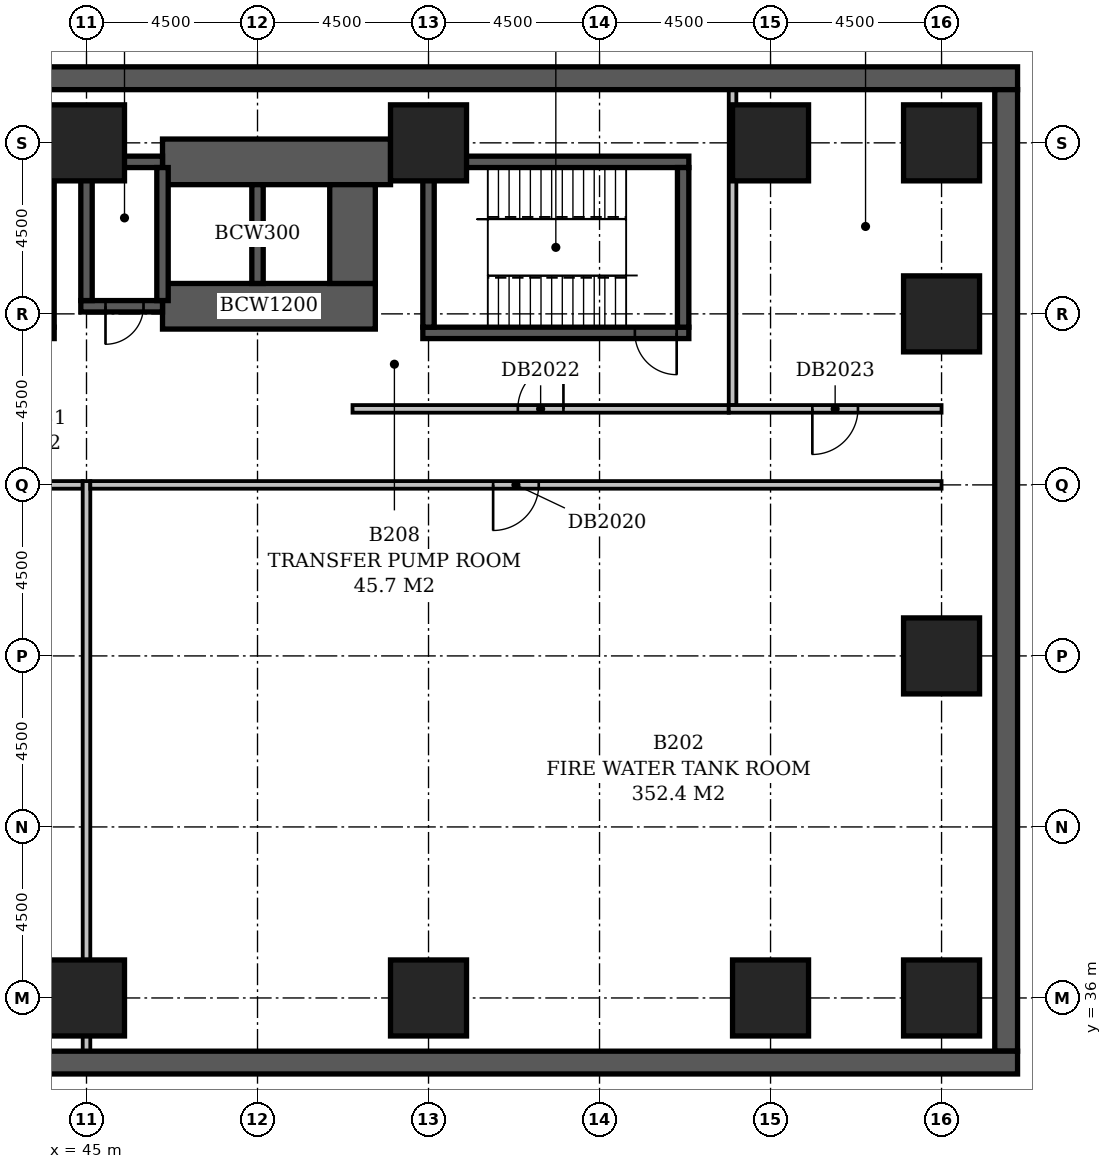
"""IFC4 building model, lengths in metres.
Left out: names, types, materials, properties, quantities, classifications, styles, units other than length and angle.
Written with IfcOpenShell. Run it as: python <this file> out.ifc"""

import sys

from ifc_helpers import new_model, si_unit, direction, frame, frame_2d, origin, origin_2d, place, context, subcontext, project, spatial, rectangle, extrude, element, fill, save


model = new_model("IFC4")
c1 = context("Model", 3, precision=1e-05, world=origin(), true_north=direction((0.0, 1.0)))
c2 = subcontext(c1, "Body", "Model", "MODEL_VIEW")
j1 = project(units=[si_unit("LENGTHUNIT", "METRE"), si_unit("PLANEANGLEUNIT", "RADIAN")], contexts=[c1])
p1 = place(None, origin())
s1 = spatial("IfcSite", under=j1, at=p1, CompositionType="ELEMENT")
p2 = place(p1, origin())
s2 = spatial("IfcBuilding", under=s1, at=p2, CompositionType="ELEMENT")
p3 = place(p2, frame((0.0, 0.0, -9.0)))
s3 = spatial("IfcBuildingStorey", under=s2, at=p3, CompositionType="ELEMENT", Elevation=-9.0)
for number, where, z_axis, x_axis in (
    (1, (45.0, 36.0, 0.0), (0.0, 0.0, 1.0), (1.0, 0.0, 0.0)),
    (2, (54.0, 36.0, 0.0), (0.0, 0.0, 1.0), (1.0, 0.0, 0.0)),
    (3, (63.0, 36.0, 0.0), (0.0, 0.0, 1.0), (1.0, 0.0, 0.0)),
    (4, (67.5, 36.0, 0.0), (0.0, 0.0, 1.0), (1.0, 0.0, 0.0)),
    (5, (67.5, 45.0, 0.0), (0.0, 0.0, 1.0), (1.0, 0.0, 0.0)),
    (6, (67.5, 54.0, 0.0), (0.0, 0.0, 1.0), (1.0, 0.0, 0.0)),
    (7, (45.0, 58.5, 0.0), (0.0, 0.0, 1.0), (1.0, 0.0, 0.0)),
    (8, (54.0, 58.5, 0.0), (0.0, 0.0, 1.0), (1.0, 0.0, 0.0)),
    (9, (63.0, 58.5, 0.0), (0.0, 0.0, 1.0), (1.0, 0.0, 0.0)),
    (10, (67.5, 58.5, 0.0), (0.0, 0.0, 1.0), (1.0, 0.0, 0.0)),
):
    element("IfcColumn", number, at=place(p3, frame(where, z_axis=z_axis, x_axis=x_axis)), inside=s3, PredefinedType="COLUMN", context=c2, shape_type="SweptSolid", body=[
        extrude(rectangle(XDim=2.0, YDim=2.0, at=origin_2d()), origin(), (0.0, 0.0, 1.0), 4.1),
    ])
p4 = place(p3, frame((-2.0, 60.2, 0.0), z_axis=(0.0, 0.0, 1.0), x_axis=(1.0, 0.0, 0.0)))
e11 = element("IfcWall", 11, at=p4, inside=s3, PredefinedType="SOLIDWALL", context=c2, shape_type="SweptSolid", body=[
    extrude(rectangle(XDim=71.5, YDim=0.6, at=frame_2d((35.75, 0.0))), origin(), (0.0, 0.0, 1.0), 4.1),
])
p5 = place(p3, frame((69.2, 59.9, 0.0), z_axis=(0.0, 0.0, 1.0), x_axis=(0.0, -1.0, 0.0)))
e12 = element("IfcWall", 12, at=p5, inside=s3, PredefinedType="SOLIDWALL", context=c2, shape_type="SweptSolid", body=[
    extrude(rectangle(XDim=25.3, YDim=0.6, at=frame_2d((12.65, 0.0))), origin(), (0.0, 0.0, 1.0), 4.1),
])
p6 = place(p3, frame((69.5, 34.3, 0.0), z_axis=(0.0, 0.0, 1.0), x_axis=(-1.0, 0.0, 0.0)))
e13 = element("IfcWall", 13, at=p6, inside=s3, PredefinedType="SOLIDWALL", context=c2, shape_type="SweptSolid", body=[
    extrude(rectangle(XDim=45.6, YDim=0.6, at=frame_2d((22.8, 0.0))), origin(), (0.0, 0.0, 1.0), 4.1),
])
p7 = place(p3, frame((37.15, 53.5, 0.0), z_axis=(0.0, 0.0, 1.0), x_axis=(1.0, 0.0, 0.0)))
e14 = element("IfcWall", 14, at=p7, inside=s3, PredefinedType="SHEAR", context=c2, shape_type="SweptSolid", body=[
    extrude(rectangle(XDim=7.0, YDim=0.3, at=frame_2d((3.5, 0.0))), origin(), (0.0, 0.0, 1.0), 4.1),
])
p8 = place(p7, frame((5.58, 0.0, 0.0)))
e15 = element("IfcOpeningElement", 15, at=p8, cuts=e14, PredefinedType="OPENING", context=c2, shape_type="SweptSolid", body=[
    extrude(rectangle(XDim=1.1, YDim=2.1, at=frame_2d((0.55, 1.05))), frame((0.0, 0.162, 0.0), z_axis=(0.0, -1.0, 0.0), x_axis=(1.0, 0.0, 0.0)), (0.0, 0.0, 1.0), 0.324),
])
p9 = place(p3, frame((53.85, 53.5, 0.0), z_axis=(0.0, 0.0, 1.0), x_axis=(1.0, 0.0, 0.0)))
e16 = element("IfcWall", 16, at=p9, inside=s3, PredefinedType="SHEAR", context=c2, shape_type="SweptSolid", body=[
    extrude(rectangle(XDim=7.0, YDim=0.3, at=frame_2d((3.5, 0.0))), origin(), (0.0, 0.0, 1.0), 4.1),
])
p10 = place(p9, frame((5.58, 0.0, 0.0)))
e17 = element("IfcOpeningElement", 17, at=p10, cuts=e16, PredefinedType="OPENING", context=c2, shape_type="SweptSolid", body=[
    extrude(rectangle(XDim=1.1, YDim=2.1, at=frame_2d((0.55, 1.05))), frame((0.0, 0.162, 0.0), z_axis=(0.0, -1.0, 0.0), x_axis=(1.0, 0.0, 0.0)), (0.0, 0.0, 1.0), 0.324),
])
p11 = place(p3, frame((44.85, 54.2, 0.0), z_axis=(0.0, 0.0, 1.0), x_axis=(1.0, 0.0, 0.0)))
e18 = element("IfcWall", 18, at=p11, inside=s3, PredefinedType="SHEAR", context=c2, shape_type="SweptSolid", body=[
    extrude(rectangle(XDim=2.15, YDim=0.3, at=frame_2d((1.075, 0.0))), origin(), (0.0, 0.0, 1.0), 4.1),
])
p12 = place(p11, frame((0.65, 0.0, 0.0)))
e19 = element("IfcOpeningElement", 19, at=p12, cuts=e18, PredefinedType="OPENING", context=c2, shape_type="SweptSolid", body=[
    extrude(rectangle(XDim=1.0, YDim=2.1, at=frame_2d((0.5, 1.05))), frame((0.0, 0.162, 0.0), z_axis=(0.0, -1.0, 0.0), x_axis=(1.0, 0.0, 0.0)), (0.0, 0.0, 1.0), 0.324),
])
p13 = place(p3, frame((47.0, 54.2, 0.0), z_axis=(0.0, 0.0, 1.0), x_axis=(1.0, 0.0, 0.0)))
e20 = element("IfcWall", 20, at=p13, inside=s3, PredefinedType="SHEAR", context=c2, shape_type="SweptSolid", body=[
    extrude(rectangle(XDim=5.6, YDim=1.2, at=frame_2d((2.8, 0.0))), origin(), (0.0, 0.0, 1.0), 4.1),
])
p14 = place(p3, frame((37.0, 58.0, 0.0), z_axis=(0.0, 0.0, 1.0), x_axis=(1.0, 0.0, 0.0)))
e21 = element("IfcWall", 21, at=p14, inside=s3, PredefinedType="SHEAR", context=c2, shape_type="SweptSolid", body=[
    extrude(rectangle(XDim=7.15, YDim=0.3, at=frame_2d((3.575, 0.0))), origin(), (0.0, 0.0, 1.0), 4.1),
])
p15 = place(p3, frame((44.85, 58.0, 0.0), z_axis=(0.0, 0.0, 1.0), x_axis=(1.0, 0.0, 0.0)))
e22 = element("IfcWall", 22, at=p15, inside=s3, PredefinedType="SHEAR", context=c2, shape_type="SweptSolid", body=[
    extrude(rectangle(XDim=2.15, YDim=0.3, at=frame_2d((1.075, 0.0))), origin(), (0.0, 0.0, 1.0), 4.1),
])
p16 = place(p3, frame((47.0, 58.0, 0.0), z_axis=(0.0, 0.0, 1.0), x_axis=(1.0, 0.0, 0.0)))
e23 = element("IfcWall", 23, at=p16, inside=s3, PredefinedType="SHEAR", context=c2, shape_type="SweptSolid", body=[
    extrude(rectangle(XDim=6.0, YDim=1.2, at=frame_2d((3.0, 0.0))), origin(), (0.0, 0.0, 1.0), 4.1),
])
p17 = place(p3, frame((53.85, 58.0, 0.0), z_axis=(0.0, 0.0, 1.0), x_axis=(1.0, 0.0, 0.0)))
e24 = element("IfcWall", 24, at=p17, inside=s3, PredefinedType="SHEAR", context=c2, shape_type="SweptSolid", body=[
    extrude(rectangle(XDim=7.0, YDim=0.3, at=frame_2d((3.5, 0.0))), origin(), (0.0, 0.0, 1.0), 4.1),
])
p18 = place(p3, frame((44.0, 53.65, 0.0), z_axis=(0.0, 0.0, 1.0), x_axis=(0.0, 1.0, 0.0)))
e25 = element("IfcWall", 25, at=p18, inside=s3, PredefinedType="SHEAR", context=c2, shape_type="SweptSolid", body=[
    extrude(rectangle(XDim=4.2, YDim=0.3, at=frame_2d((2.1, 0.0))), origin(), (0.0, 0.0, 1.0), 4.1),
])
for number, where, z_axis, x_axis in (
    (26, (45.0, 54.35, 0.0), (0.0, 0.0, 1.0), (0.0, 1.0, 0.0)),
    (27, (47.0, 54.35, 0.0), (0.0, 0.0, 1.0), (0.0, 1.0, 0.0)),
):
    element("IfcWall", number, at=place(p3, frame(where, z_axis=z_axis, x_axis=x_axis)), inside=s3, PredefinedType="SHEAR", context=c2, shape_type="SweptSolid", body=[
        extrude(rectangle(XDim=3.5, YDim=0.3, at=frame_2d((1.75, 0.0))), origin(), (0.0, 0.0, 1.0), 4.1),
    ])
p19 = place(p3, frame((49.5, 54.8, 0.0), z_axis=(0.0, 0.0, 1.0), x_axis=(0.0, 1.0, 0.0)))
e28 = element("IfcWall", 28, at=p19, inside=s3, PredefinedType="SHEAR", context=c2, shape_type="SweptSolid", body=[
    extrude(rectangle(XDim=2.6, YDim=0.3, at=frame_2d((1.3, 0.0))), origin(), (0.0, 0.0, 1.0), 4.1),
])
p20 = place(p3, frame((52.0, 54.8, 0.0), z_axis=(0.0, 0.0, 1.0), x_axis=(0.0, 1.0, 0.0)))
e29 = element("IfcWall", 29, at=p20, inside=s3, PredefinedType="SHEAR", context=c2, shape_type="SweptSolid", body=[
    extrude(rectangle(XDim=2.6, YDim=1.2, at=frame_2d((1.3, 0.0))), origin(), (0.0, 0.0, 1.0), 4.1),
])
for number, where, z_axis, x_axis in (
    (30, (54.0, 53.65, 0.0), (0.0, 0.0, 1.0), (0.0, 1.0, 0.0)),
    (31, (60.7, 53.65, 0.0), (0.0, 0.0, 1.0), (0.0, 1.0, 0.0)),
):
    element("IfcWall", number, at=place(p3, frame(where, z_axis=z_axis, x_axis=x_axis)), inside=s3, PredefinedType="SHEAR", context=c2, shape_type="SweptSolid", body=[
        extrude(rectangle(XDim=4.2, YDim=0.3, at=frame_2d((2.1, 0.0))), origin(), (0.0, 0.0, 1.0), 4.1),
    ])
p21 = place(p3, frame((22.6, 49.5, 0.0), z_axis=(0.0, 0.0, 1.0), x_axis=(1.0, 0.0, 0.0)))
e32 = element("IfcWall", 32, at=p21, inside=s3, PredefinedType="PARTITIONING", context=c2, shape_type="SweptSolid", body=[
    extrude(rectangle(XDim=22.3, YDim=0.2, at=frame_2d((11.15, 0.0))), origin(), (0.0, 0.0, 1.0), 4.1),
])
p22 = place(p21, frame((10.55, 0.0, 0.0)))
e33 = element("IfcOpeningElement", 33, at=p22, cuts=e32, PredefinedType="OPENING", context=c2, shape_type="SweptSolid", body=[
    extrude(rectangle(XDim=1.2, YDim=2.1, at=frame_2d((0.6, 1.05))), frame((0.0, 0.112, 0.0), z_axis=(0.0, -1.0, 0.0), x_axis=(1.0, 0.0, 0.0)), (0.0, 0.0, 1.0), 0.224),
])
p23 = place(p3, frame((45.0, 49.6, 0.0), z_axis=(0.0, 0.0, 1.0), x_axis=(0.0, -1.0, 0.0)))
e34 = element("IfcWall", 34, at=p23, inside=s3, PredefinedType="PARTITIONING", context=c2, shape_type="SweptSolid", body=[
    extrude(rectangle(XDim=15.0, YDim=0.2, at=frame_2d((7.5, 0.0))), origin(), (0.0, 0.0, 1.0), 3.4),
])
p24 = place(p3, frame((45.1, 49.5, 0.0), z_axis=(0.0, 0.0, 1.0), x_axis=(1.0, 0.0, 0.0)))
e35 = element("IfcWall", 35, at=p24, inside=s3, PredefinedType="PARTITIONING", context=c2, shape_type="SweptSolid", body=[
    extrude(rectangle(XDim=22.4, YDim=0.2, at=frame_2d((11.2, 0.0))), origin(), (0.0, 0.0, 1.0), 4.1),
])
p25 = place(p24, frame((10.6, 0.0, 0.0)))
e36 = element("IfcOpeningElement", 36, at=p25, cuts=e35, PredefinedType="OPENING", context=c2, shape_type="SweptSolid", body=[
    extrude(rectangle(XDim=1.2, YDim=2.1, at=frame_2d((0.6, 1.05))), frame((0.0, 0.112, 0.0), z_axis=(0.0, -1.0, 0.0), x_axis=(1.0, 0.0, 0.0)), (0.0, 0.0, 1.0), 0.224),
])
p26 = place(p3, frame((61.9, 51.5, 0.0), z_axis=(0.0, 0.0, 1.0), x_axis=(-1.0, 0.0, 0.0)))
e37 = element("IfcWall", 37, at=p26, inside=s3, PredefinedType="PARTITIONING", context=c2, shape_type="SweptSolid", body=[
    extrude(rectangle(XDim=9.9, YDim=0.2, at=frame_2d((4.95, 0.0))), origin(), (0.0, 0.0, 1.0), 4.1),
])
p27 = place(p26, frame((4.35, 0.0, 0.0)))
e38 = element("IfcOpeningElement", 38, at=p27, cuts=e37, PredefinedType="OPENING", context=c2, shape_type="SweptSolid", body=[
    extrude(rectangle(XDim=1.2, YDim=2.1, at=frame_2d((0.6, 1.05))), frame((0.0, 0.112, 0.0), z_axis=(0.0, -1.0, 0.0), x_axis=(1.0, 0.0, 0.0)), (0.0, 0.0, 1.0), 0.224),
])
p28 = place(p3, frame((67.5, 51.5, 0.0), z_axis=(0.0, 0.0, 1.0), x_axis=(-1.0, 0.0, 0.0)))
e39 = element("IfcWall", 39, at=p28, inside=s3, PredefinedType="PARTITIONING", context=c2, shape_type="SweptSolid", body=[
    extrude(rectangle(XDim=5.6, YDim=0.2, at=frame_2d((2.8, 0.0))), origin(), (0.0, 0.0, 1.0), 4.1),
])
p29 = place(p28, frame((2.2, 0.0, 0.0)))
e40 = element("IfcOpeningElement", 40, at=p29, cuts=e39, PredefinedType="OPENING", context=c2, shape_type="SweptSolid", body=[
    extrude(rectangle(XDim=1.2, YDim=2.1, at=frame_2d((0.6, 1.05))), frame((0.0, 0.112, 0.0), z_axis=(0.0, -1.0, 0.0), x_axis=(1.0, 0.0, 0.0)), (0.0, 0.0, 1.0), 0.224),
])
p30 = place(p3, frame((62.0, 59.9, 0.0), z_axis=(0.0, 0.0, 1.0), x_axis=(0.0, -1.0, 0.0)))
e41 = element("IfcWall", 41, at=p30, inside=s3, PredefinedType="PARTITIONING", context=c2, shape_type="SweptSolid", body=[
    extrude(rectangle(XDim=8.3, YDim=0.2, at=frame_2d((4.15, 0.0))), origin(), (0.0, 0.0, 1.0), 4.1),
])
p31 = place(p12, frame((1.0, 0.0, 0.0), z_axis=(0.0, 0.0, 1.0), x_axis=(-1.0, 0.0, 0.0)))
e42 = element("IfcDoor", 42, at=p31, inside=s3, OperationType="SINGLE_SWING_RIGHT", PredefinedType="DOOR", context=c2, shape_type="SweptSolid", body=[
    extrude(rectangle(XDim=1.0, YDim=2.1, at=frame_2d((0.5, 1.05))), frame((0.0, 0.025, 0.0), z_axis=(0.0, -1.0, 0.0), x_axis=(1.0, 0.0, 0.0)), (0.0, 0.0, 1.0), 0.05),
])
fill(e19, e42)
p32 = place(p10, origin())
e43 = element("IfcDoor", 43, at=p32, inside=s3, OperationType="SINGLE_SWING_RIGHT", PredefinedType="DOOR", context=c2, shape_type="SweptSolid", body=[
    extrude(rectangle(XDim=1.1, YDim=2.1, at=frame_2d((0.55, 1.05))), frame((0.0, 0.025, 0.0), z_axis=(0.0, -1.0, 0.0), x_axis=(1.0, 0.0, 0.0)), (0.0, 0.0, 1.0), 0.05),
])
fill(e17, e43)
p33 = place(p25, frame((1.2, 0.0, 0.0), z_axis=(0.0, 0.0, 1.0), x_axis=(-1.0, 0.0, 0.0)))
e44 = element("IfcDoor", 44, at=p33, inside=s3, OperationType="SINGLE_SWING_RIGHT", PredefinedType="DOOR", context=c2, shape_type="SweptSolid", body=[
    extrude(rectangle(XDim=1.2, YDim=2.1, at=frame_2d((0.6, 1.05))), frame((0.0, 0.025, 0.0), z_axis=(0.0, -1.0, 0.0), x_axis=(1.0, 0.0, 0.0)), (0.0, 0.0, 1.0), 0.05),
])
fill(e36, e44)
p34 = place(p27, frame((1.2, 0.0, 0.0), z_axis=(0.0, 0.0, 1.0), x_axis=(-1.0, 0.0, 0.0)))
e45 = element("IfcDoor", 45, at=p34, inside=s3, OperationType="SINGLE_SWING_RIGHT", PredefinedType="DOOR", context=c2, shape_type="SweptSolid", body=[
    extrude(rectangle(XDim=1.2, YDim=2.1, at=frame_2d((0.6, 1.05))), frame((0.0, 0.025, 0.0), z_axis=(0.0, -1.0, 0.0), x_axis=(1.0, 0.0, 0.0)), (0.0, 0.0, 1.0), 0.05),
])
fill(e38, e45)
p35 = place(p29, frame((1.2, 0.0, 0.0), z_axis=(0.0, 0.0, 1.0), x_axis=(-1.0, 0.0, 0.0)))
e46 = element("IfcDoor", 46, at=p35, inside=s3, OperationType="SINGLE_SWING_LEFT", PredefinedType="DOOR", context=c2, shape_type="SweptSolid", body=[
    extrude(rectangle(XDim=1.2, YDim=2.1, at=frame_2d((0.6, 1.05))), frame((0.0, 0.025, 0.0), z_axis=(0.0, -1.0, 0.0), x_axis=(1.0, 0.0, 0.0)), (0.0, 0.0, 1.0), 0.05),
])
fill(e40, e46)
save(model, sys.argv[1])
